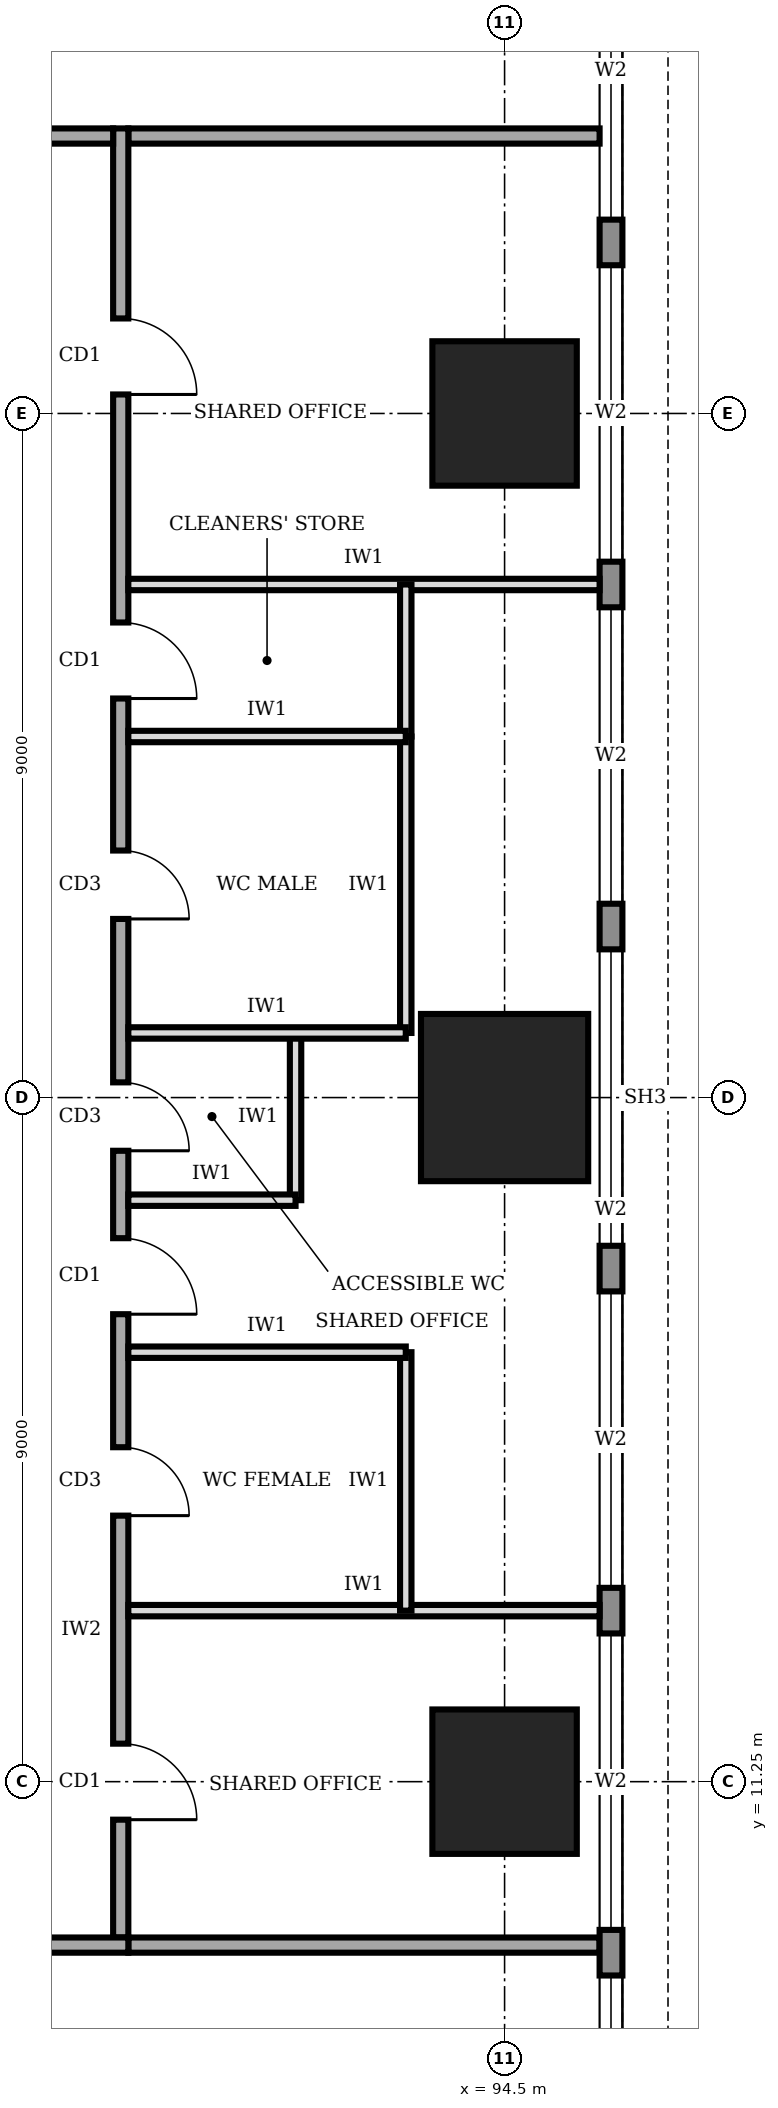
"""IFC4 building model, lengths in metres.
Left out: names, types, materials, properties, quantities, classifications, styles, units other than length and angle.
Written with IfcOpenShell. Run it as: python <this file> out.ifc"""

import sys

from ifc_helpers import new_model, si_unit, direction, frame, frame_2d, origin, origin_2d, place, context, subcontext, project, spatial, rectangle, extrude, element, fill, save


model = new_model("IFC4")
c1 = context("Model", 3, precision=1e-05, world=origin(), true_north=direction((0.0, 1.0)))
c2 = subcontext(c1, "Body", "Model", "MODEL_VIEW")
j1 = project(units=[si_unit("LENGTHUNIT", "METRE"), si_unit("PLANEANGLEUNIT", "RADIAN")], contexts=[c1])
p1 = place(None, origin())
s1 = spatial("IfcSite", under=j1, at=p1, CompositionType="ELEMENT")
p2 = place(p1, origin())
s2 = spatial("IfcBuilding", under=s1, at=p2, CompositionType="ELEMENT")
p3 = place(p2, frame((0.0, 0.0, 141.0)))
s3 = spatial("IfcBuildingStorey", under=s2, at=p3, CompositionType="ELEMENT", Elevation=141.0)
p4 = place(p3, frame((94.5, 11.25, 0.0), z_axis=(0.0, 0.0, 1.0), x_axis=(1.0, 0.0, 0.0)))
e1 = element("IfcColumn", 1, at=p4, inside=s3, PredefinedType="COLUMN", context=c2, shape_type="SweptSolid", body=[
    extrude(rectangle(XDim=1.9, YDim=1.9, at=origin_2d()), origin(), (0.0, 0.0, 1.0), 4.0),
])
p5 = place(p3, frame((94.5, 20.25, 0.0), z_axis=(0.0, 0.0, 1.0), x_axis=(1.0, 0.0, 0.0)))
e2 = element("IfcColumn", 2, at=p5, inside=s3, PredefinedType="COLUMN", context=c2, shape_type="SweptSolid", body=[
    extrude(rectangle(XDim=2.2, YDim=2.2, at=origin_2d()), origin(), (0.0, 0.0, 1.0), 4.0),
])
p6 = place(p3, frame((94.5, 29.25, 0.0), z_axis=(0.0, 0.0, 1.0), x_axis=(1.0, 0.0, 0.0)))
e3 = element("IfcColumn", 3, at=p6, inside=s3, PredefinedType="COLUMN", context=c2, shape_type="SweptSolid", body=[
    extrude(rectangle(XDim=1.9, YDim=1.9, at=origin_2d()), origin(), (0.0, 0.0, 1.0), 4.0),
])
p7 = place(p3, frame((95.9, 3.32, 0.0), z_axis=(0.0, 0.0, 1.0), x_axis=(0.0, 1.0, 0.0)))
e4 = element("IfcWall", 4, at=p7, inside=s3, PredefinedType="STANDARD", context=c2, shape_type="SweptSolid", body=[
    extrude(rectangle(XDim=33.86, YDim=0.3, at=frame_2d((16.93, 0.0))), origin(), (0.0, 0.0, 1.0), 3.75),
])
p8 = place(p7, frame((1.48, 0.0, 0.6)))
e5 = element("IfcOpeningElement", 5, at=p8, cuts=e4, PredefinedType="OPENING", context=c2, shape_type="SweptSolid", body=[
    extrude(rectangle(XDim=3.9, YDim=2.6, at=frame_2d((1.95, 1.3))), frame((0.0, 0.16, 0.0), z_axis=(0.0, -1.0, 0.0), x_axis=(1.0, 0.0, 0.0)), (0.0, 0.0, 1.0), 0.32),
])
p9 = place(p7, frame((5.98, 0.0, 0.6)))
e6 = element("IfcOpeningElement", 6, at=p9, cuts=e4, PredefinedType="OPENING", context=c2, shape_type="SweptSolid", body=[
    extrude(rectangle(XDim=3.9, YDim=2.6, at=frame_2d((1.95, 1.3))), frame((0.0, 0.16, 0.0), z_axis=(0.0, -1.0, 0.0), x_axis=(1.0, 0.0, 0.0)), (0.0, 0.0, 1.0), 0.32),
])
p10 = place(p7, frame((10.48, 0.0, 0.6)))
e7 = element("IfcOpeningElement", 7, at=p10, cuts=e4, PredefinedType="OPENING", context=c2, shape_type="SweptSolid", body=[
    extrude(rectangle(XDim=3.9, YDim=2.6, at=frame_2d((1.95, 1.3))), frame((0.0, 0.16, 0.0), z_axis=(0.0, -1.0, 0.0), x_axis=(1.0, 0.0, 0.0)), (0.0, 0.0, 1.0), 0.32),
])
p11 = place(p7, frame((14.98, 0.0, 0.6)))
e8 = element("IfcOpeningElement", 8, at=p11, cuts=e4, PredefinedType="OPENING", context=c2, shape_type="SweptSolid", body=[
    extrude(rectangle(XDim=3.9, YDim=2.6, at=frame_2d((1.95, 1.3))), frame((0.0, 0.16, 0.0), z_axis=(0.0, -1.0, 0.0), x_axis=(1.0, 0.0, 0.0)), (0.0, 0.0, 1.0), 0.32),
])
p12 = place(p7, frame((19.48, 0.0, 0.6)))
e9 = element("IfcOpeningElement", 9, at=p12, cuts=e4, PredefinedType="OPENING", context=c2, shape_type="SweptSolid", body=[
    extrude(rectangle(XDim=3.9, YDim=2.6, at=frame_2d((1.95, 1.3))), frame((0.0, 0.16, 0.0), z_axis=(0.0, -1.0, 0.0), x_axis=(1.0, 0.0, 0.0)), (0.0, 0.0, 1.0), 0.32),
])
p13 = place(p7, frame((23.98, 0.0, 0.6)))
e10 = element("IfcOpeningElement", 10, at=p13, cuts=e4, PredefinedType="OPENING", context=c2, shape_type="SweptSolid", body=[
    extrude(rectangle(XDim=3.9, YDim=2.6, at=frame_2d((1.95, 1.3))), frame((0.0, 0.16, 0.0), z_axis=(0.0, -1.0, 0.0), x_axis=(1.0, 0.0, 0.0)), (0.0, 0.0, 1.0), 0.32),
])
p14 = place(p7, frame((28.48, 0.0, 0.6)))
e11 = element("IfcOpeningElement", 11, at=p14, cuts=e4, PredefinedType="OPENING", context=c2, shape_type="SweptSolid", body=[
    extrude(rectangle(XDim=3.9, YDim=2.6, at=frame_2d((1.95, 1.3))), frame((0.0, 0.16, 0.0), z_axis=(0.0, -1.0, 0.0), x_axis=(1.0, 0.0, 0.0)), (0.0, 0.0, 1.0), 0.32),
])
p15 = place(p3, frame((63.3, 9.1, 0.0), z_axis=(0.0, 0.0, 1.0), x_axis=(1.0, 0.0, 0.0)))
e12 = element("IfcWall", 12, at=p15, inside=s3, PredefinedType="SOLIDWALL", context=c2, shape_type="SweptSolid", body=[
    extrude(rectangle(XDim=26.25, YDim=0.2, at=frame_2d((13.125, 0.0))), origin(), (0.0, 0.0, 1.0), 3.75),
])
p16 = place(p15, frame((6.0, 0.0, 0.0)))
e13 = element("IfcOpeningElement", 13, at=p16, cuts=e12, PredefinedType="OPENING", context=c2, shape_type="SweptSolid", body=[
    extrude(rectangle(XDim=1.0, YDim=2.1, at=frame_2d((0.5, 1.05))), frame((0.0, 0.11, 0.0), z_axis=(0.0, -1.0, 0.0), x_axis=(1.0, 0.0, 0.0)), (0.0, 0.0, 1.0), 0.22),
])
p17 = place(p15, frame((17.2, 0.0, 0.0)))
e14 = element("IfcOpeningElement", 14, at=p17, cuts=e12, PredefinedType="OPENING", context=c2, shape_type="SweptSolid", body=[
    extrude(rectangle(XDim=1.0, YDim=2.1, at=frame_2d((0.5, 1.05))), frame((0.0, 0.11, 0.0), z_axis=(0.0, -1.0, 0.0), x_axis=(1.0, 0.0, 0.0)), (0.0, 0.0, 1.0), 0.22),
])
p18 = place(p15, frame((23.825, 0.0, 0.0)))
e15 = element("IfcOpeningElement", 15, at=p18, cuts=e12, PredefinedType="OPENING", context=c2, shape_type="SweptSolid", body=[
    extrude(rectangle(XDim=1.0, YDim=2.1, at=frame_2d((0.5, 1.05))), frame((0.0, 0.11, 0.0), z_axis=(0.0, -1.0, 0.0), x_axis=(1.0, 0.0, 0.0)), (0.0, 0.0, 1.0), 0.22),
])
p19 = place(p3, frame((89.45, 9.2, 0.0), z_axis=(0.0, 0.0, 1.0), x_axis=(0.0, 1.0, 0.0)))
e16 = element("IfcWall", 16, at=p19, inside=s3, PredefinedType="SOLIDWALL", context=c2, shape_type="SweptSolid", body=[
    extrude(rectangle(XDim=23.8, YDim=0.2, at=frame_2d((11.9, 0.0))), origin(), (0.0, 0.0, 1.0), 3.75),
])
p20 = place(p19, frame((1.55, 0.0, 0.0)))
e17 = element("IfcOpeningElement", 17, at=p20, cuts=e16, PredefinedType="OPENING", context=c2, shape_type="SweptSolid", body=[
    extrude(rectangle(XDim=1.0, YDim=2.1, at=frame_2d((0.5, 1.05))), frame((0.0, 0.11, 0.0), z_axis=(0.0, -1.0, 0.0), x_axis=(1.0, 0.0, 0.0)), (0.0, 0.0, 1.0), 0.22),
])
p21 = place(p19, frame((5.55, 0.0, 0.0)))
e18 = element("IfcOpeningElement", 18, at=p21, cuts=e16, PredefinedType="OPENING", context=c2, shape_type="SweptSolid", body=[
    extrude(rectangle(XDim=0.9, YDim=2.1, at=frame_2d((0.45, 1.05))), frame((0.0, 0.11, 0.0), z_axis=(0.0, -1.0, 0.0), x_axis=(1.0, 0.0, 0.0)), (0.0, 0.0, 1.0), 0.22),
])
p22 = place(p19, frame((10.35, 0.0, 0.0)))
e19 = element("IfcOpeningElement", 19, at=p22, cuts=e16, PredefinedType="OPENING", context=c2, shape_type="SweptSolid", body=[
    extrude(rectangle(XDim=0.9, YDim=2.1, at=frame_2d((0.45, 1.05))), frame((0.0, 0.11, 0.0), z_axis=(0.0, -1.0, 0.0), x_axis=(1.0, 0.0, 0.0)), (0.0, 0.0, 1.0), 0.22),
])
p23 = place(p19, frame((13.4, 0.0, 0.0)))
e20 = element("IfcOpeningElement", 20, at=p23, cuts=e16, PredefinedType="OPENING", context=c2, shape_type="SweptSolid", body=[
    extrude(rectangle(XDim=0.9, YDim=2.1, at=frame_2d((0.45, 1.05))), frame((0.0, 0.11, 0.0), z_axis=(0.0, -1.0, 0.0), x_axis=(1.0, 0.0, 0.0)), (0.0, 0.0, 1.0), 0.22),
])
p24 = place(p19, frame((16.3, 0.0, 0.0)))
e21 = element("IfcOpeningElement", 21, at=p24, cuts=e16, PredefinedType="OPENING", context=c2, shape_type="SweptSolid", body=[
    extrude(rectangle(XDim=1.0, YDim=2.1, at=frame_2d((0.5, 1.05))), frame((0.0, 0.11, 0.0), z_axis=(0.0, -1.0, 0.0), x_axis=(1.0, 0.0, 0.0)), (0.0, 0.0, 1.0), 0.22),
])
p25 = place(p19, frame((8.2, 0.0, 0.0)))
e22 = element("IfcOpeningElement", 22, at=p25, cuts=e16, PredefinedType="OPENING", context=c2, shape_type="SweptSolid", body=[
    extrude(rectangle(XDim=1.0, YDim=2.1, at=frame_2d((0.5, 1.05))), frame((0.0, 0.11, 0.0), z_axis=(0.0, -1.0, 0.0), x_axis=(1.0, 0.0, 0.0)), (0.0, 0.0, 1.0), 0.22),
])
p26 = place(p19, frame((20.3, 0.0, 0.0)))
e23 = element("IfcOpeningElement", 23, at=p26, cuts=e16, PredefinedType="OPENING", context=c2, shape_type="SweptSolid", body=[
    extrude(rectangle(XDim=1.0, YDim=2.1, at=frame_2d((0.5, 1.05))), frame((0.0, 0.11, 0.0), z_axis=(0.0, -1.0, 0.0), x_axis=(1.0, 0.0, 0.0)), (0.0, 0.0, 1.0), 0.22),
])
p27 = place(p3, frame((89.35, 32.9, 0.0), z_axis=(0.0, 0.0, 1.0), x_axis=(-1.0, 0.0, 0.0)))
e24 = element("IfcWall", 24, at=p27, inside=s3, PredefinedType="SOLIDWALL", context=c2, shape_type="SweptSolid", body=[
    extrude(rectangle(XDim=26.05, YDim=0.2, at=frame_2d((13.025, 0.0))), origin(), (0.0, 0.0, 1.0), 3.75),
])
p28 = place(p27, frame((19.05, 0.0, 0.0)))
e25 = element("IfcOpeningElement", 25, at=p28, cuts=e24, PredefinedType="OPENING", context=c2, shape_type="SweptSolid", body=[
    extrude(rectangle(XDim=1.0, YDim=2.1, at=frame_2d((0.5, 1.05))), frame((0.0, 0.11, 0.0), z_axis=(0.0, -1.0, 0.0), x_axis=(1.0, 0.0, 0.0)), (0.0, 0.0, 1.0), 0.22),
])
p29 = place(p27, frame((5.425, 0.0, 0.0)))
e26 = element("IfcOpeningElement", 26, at=p29, cuts=e24, PredefinedType="OPENING", context=c2, shape_type="SweptSolid", body=[
    extrude(rectangle(XDim=1.8, YDim=2.1, at=frame_2d((0.9, 1.05))), frame((0.0, 0.11, 0.0), z_axis=(0.0, -1.0, 0.0), x_axis=(1.0, 0.0, 0.0)), (0.0, 0.0, 1.0), 0.22),
])
for number, where, z_axis, x_axis in (
    (27, (89.55, 9.1, 0.0), (0.0, 0.0, 1.0), (1.0, 0.0, 0.0)),
    (28, (89.55, 32.9, 0.0), (0.0, 0.0, 1.0), (1.0, 0.0, 0.0)),
):
    element("IfcWall", number, at=place(p3, frame(where, z_axis=z_axis, x_axis=x_axis)), inside=s3, PredefinedType="SOLIDWALL", context=c2, shape_type="SweptSolid", body=[
        extrude(rectangle(XDim=6.2, YDim=0.2, at=frame_2d((3.1, 0.0))), origin(), (0.0, 0.0, 1.0), 3.75),
    ])
for number, where, z_axis, x_axis in (
    (29, (89.55, 13.5, 0.0), (0.0, 0.0, 1.0), (1.0, 0.0, 0.0)),
    (30, (89.55, 27.0, 0.0), (0.0, 0.0, 1.0), (1.0, 0.0, 0.0)),
):
    element("IfcWall", number, at=place(p3, frame(where, z_axis=z_axis, x_axis=x_axis)), inside=s3, PredefinedType="PARTITIONING", context=c2, shape_type="SweptSolid", body=[
        extrude(rectangle(XDim=6.2, YDim=0.15, at=frame_2d((3.1, 0.0))), origin(), (0.0, 0.0, 1.0), 3.75),
    ])
p30 = place(p3, frame((89.55, 16.9, 0.0), z_axis=(0.0, 0.0, 1.0), x_axis=(1.0, 0.0, 0.0)))
e31 = element("IfcWall", 31, at=p30, inside=s3, PredefinedType="PARTITIONING", context=c2, shape_type="SweptSolid", body=[
    extrude(rectangle(XDim=3.65, YDim=0.15, at=frame_2d((1.825, 0.0))), origin(), (0.0, 0.0, 1.0), 3.75),
])
p31 = place(p3, frame((89.55, 18.9, 0.0), z_axis=(0.0, 0.0, 1.0), x_axis=(1.0, 0.0, 0.0)))
e32 = element("IfcWall", 32, at=p31, inside=s3, PredefinedType="PARTITIONING", context=c2, shape_type="SweptSolid", body=[
    extrude(rectangle(XDim=2.2, YDim=0.15, at=frame_2d((1.1, 0.0))), origin(), (0.0, 0.0, 1.0), 3.75),
])
p32 = place(p3, frame((89.55, 21.1, 0.0), z_axis=(0.0, 0.0, 1.0), x_axis=(1.0, 0.0, 0.0)))
e33 = element("IfcWall", 33, at=p32, inside=s3, PredefinedType="PARTITIONING", context=c2, shape_type="SweptSolid", body=[
    extrude(rectangle(XDim=3.65, YDim=0.15, at=frame_2d((1.825, 0.0))), origin(), (0.0, 0.0, 1.0), 2.85),
])
p33 = place(p3, frame((89.55, 25.0, 0.0), z_axis=(0.0, 0.0, 1.0), x_axis=(1.0, 0.0, 0.0)))
e34 = element("IfcWall", 34, at=p33, inside=s3, PredefinedType="PARTITIONING", context=c2, shape_type="SweptSolid", body=[
    extrude(rectangle(XDim=3.65, YDim=0.15, at=frame_2d((1.825, 0.0))), origin(), (0.0, 0.0, 1.0), 3.75),
])
p34 = place(p3, frame((93.2, 13.5, 0.0), z_axis=(0.0, 0.0, 1.0), x_axis=(0.0, 1.0, 0.0)))
e35 = element("IfcWall", 35, at=p34, inside=s3, PredefinedType="PARTITIONING", context=c2, shape_type="SweptSolid", body=[
    extrude(rectangle(XDim=3.4, YDim=0.15, at=frame_2d((1.7, 0.0))), origin(), (0.0, 0.0, 1.0), 3.75),
])
p35 = place(p3, frame((91.75, 18.9, 0.0), z_axis=(0.0, 0.0, 1.0), x_axis=(0.0, 1.0, 0.0)))
e36 = element("IfcWall", 36, at=p35, inside=s3, PredefinedType="PARTITIONING", context=c2, shape_type="SweptSolid", body=[
    extrude(rectangle(XDim=2.2, YDim=0.15, at=frame_2d((1.1, 0.0))), origin(), (0.0, 0.0, 1.0), 3.75),
])
p36 = place(p3, frame((93.2, 21.1, 0.0), z_axis=(0.0, 0.0, 1.0), x_axis=(0.0, 1.0, 0.0)))
e37 = element("IfcWall", 37, at=p36, inside=s3, PredefinedType="PARTITIONING", context=c2, shape_type="SweptSolid", body=[
    extrude(rectangle(XDim=3.9, YDim=0.15, at=frame_2d((1.95, 0.0))), origin(), (0.0, 0.0, 1.0), 3.75),
])
p37 = place(p3, frame((93.2, 25.0, 0.0), z_axis=(0.0, 0.0, 1.0), x_axis=(0.0, 1.0, 0.0)))
e38 = element("IfcWall", 38, at=p37, inside=s3, PredefinedType="PARTITIONING", context=c2, shape_type="SweptSolid", body=[
    extrude(rectangle(XDim=2.0, YDim=0.15, at=frame_2d((1.0, 0.0))), origin(), (0.0, 0.0, 1.0), 3.75),
])
p38 = place(p8, origin())
e39 = element("IfcWindow", 39, at=p38, inside=s3, PartitioningType="SINGLE_PANEL", PredefinedType="WINDOW", context=c2, shape_type="SweptSolid", body=[
    extrude(rectangle(XDim=3.9, YDim=2.6, at=frame_2d((1.95, 1.3))), frame((0.0, 0.03, 0.0), z_axis=(0.0, -1.0, 0.0), x_axis=(1.0, 0.0, 0.0)), (0.0, 0.0, 1.0), 0.06),
])
fill(e5, e39)
p39 = place(p9, origin())
e40 = element("IfcWindow", 40, at=p39, inside=s3, PartitioningType="SINGLE_PANEL", PredefinedType="WINDOW", context=c2, shape_type="SweptSolid", body=[
    extrude(rectangle(XDim=3.9, YDim=2.6, at=frame_2d((1.95, 1.3))), frame((0.0, 0.03, 0.0), z_axis=(0.0, -1.0, 0.0), x_axis=(1.0, 0.0, 0.0)), (0.0, 0.0, 1.0), 0.06),
])
fill(e6, e40)
p40 = place(p10, origin())
e41 = element("IfcWindow", 41, at=p40, inside=s3, PartitioningType="SINGLE_PANEL", PredefinedType="WINDOW", context=c2, shape_type="SweptSolid", body=[
    extrude(rectangle(XDim=3.9, YDim=2.6, at=frame_2d((1.95, 1.3))), frame((0.0, 0.03, 0.0), z_axis=(0.0, -1.0, 0.0), x_axis=(1.0, 0.0, 0.0)), (0.0, 0.0, 1.0), 0.06),
])
fill(e7, e41)
p41 = place(p11, origin())
e42 = element("IfcWindow", 42, at=p41, inside=s3, PartitioningType="SINGLE_PANEL", PredefinedType="WINDOW", context=c2, shape_type="SweptSolid", body=[
    extrude(rectangle(XDim=3.9, YDim=2.6, at=frame_2d((1.95, 1.3))), frame((0.0, 0.03, 0.0), z_axis=(0.0, -1.0, 0.0), x_axis=(1.0, 0.0, 0.0)), (0.0, 0.0, 1.0), 0.06),
])
fill(e8, e42)
p42 = place(p12, origin())
e43 = element("IfcWindow", 43, at=p42, inside=s3, PartitioningType="SINGLE_PANEL", PredefinedType="WINDOW", context=c2, shape_type="SweptSolid", body=[
    extrude(rectangle(XDim=3.9, YDim=2.6, at=frame_2d((1.95, 1.3))), frame((0.0, 0.03, 0.0), z_axis=(0.0, -1.0, 0.0), x_axis=(1.0, 0.0, 0.0)), (0.0, 0.0, 1.0), 0.06),
])
fill(e9, e43)
p43 = place(p13, origin())
e44 = element("IfcWindow", 44, at=p43, inside=s3, PartitioningType="SINGLE_PANEL", PredefinedType="WINDOW", context=c2, shape_type="SweptSolid", body=[
    extrude(rectangle(XDim=3.9, YDim=2.6, at=frame_2d((1.95, 1.3))), frame((0.0, 0.03, 0.0), z_axis=(0.0, -1.0, 0.0), x_axis=(1.0, 0.0, 0.0)), (0.0, 0.0, 1.0), 0.06),
])
fill(e10, e44)
p44 = place(p14, origin())
e45 = element("IfcWindow", 45, at=p44, inside=s3, PartitioningType="SINGLE_PANEL", PredefinedType="WINDOW", context=c2, shape_type="SweptSolid", body=[
    extrude(rectangle(XDim=3.9, YDim=2.6, at=frame_2d((1.95, 1.3))), frame((0.0, 0.03, 0.0), z_axis=(0.0, -1.0, 0.0), x_axis=(1.0, 0.0, 0.0)), (0.0, 0.0, 1.0), 0.06),
])
fill(e11, e45)
p45 = place(p20, frame((1.0, 0.0, 0.0), z_axis=(0.0, 0.0, 1.0), x_axis=(-1.0, 0.0, 0.0)))
e46 = element("IfcDoor", 46, at=p45, inside=s3, OperationType="SINGLE_SWING_RIGHT", PredefinedType="DOOR", context=c2, shape_type="SweptSolid", body=[
    extrude(rectangle(XDim=1.0, YDim=2.1, at=frame_2d((0.5, 1.05))), frame((0.0, 0.025, 0.0), z_axis=(0.0, -1.0, 0.0), x_axis=(1.0, 0.0, 0.0)), (0.0, 0.0, 1.0), 0.05),
])
fill(e17, e46)
p46 = place(p21, frame((0.9, 0.0, 0.0), z_axis=(0.0, 0.0, 1.0), x_axis=(-1.0, 0.0, 0.0)))
e47 = element("IfcDoor", 47, at=p46, inside=s3, OperationType="SINGLE_SWING_RIGHT", PredefinedType="DOOR", context=c2, shape_type="SweptSolid", body=[
    extrude(rectangle(XDim=0.9, YDim=2.1, at=frame_2d((0.45, 1.05))), frame((0.0, 0.025, 0.0), z_axis=(0.0, -1.0, 0.0), x_axis=(1.0, 0.0, 0.0)), (0.0, 0.0, 1.0), 0.05),
])
fill(e18, e47)
p47 = place(p22, frame((0.9, 0.0, 0.0), z_axis=(0.0, 0.0, 1.0), x_axis=(-1.0, 0.0, 0.0)))
e48 = element("IfcDoor", 48, at=p47, inside=s3, OperationType="SINGLE_SWING_RIGHT", PredefinedType="DOOR", context=c2, shape_type="SweptSolid", body=[
    extrude(rectangle(XDim=0.9, YDim=2.1, at=frame_2d((0.45, 1.05))), frame((0.0, 0.025, 0.0), z_axis=(0.0, -1.0, 0.0), x_axis=(1.0, 0.0, 0.0)), (0.0, 0.0, 1.0), 0.05),
])
fill(e19, e48)
p48 = place(p23, frame((0.9, 0.0, 0.0), z_axis=(0.0, 0.0, 1.0), x_axis=(-1.0, 0.0, 0.0)))
e49 = element("IfcDoor", 49, at=p48, inside=s3, OperationType="SINGLE_SWING_RIGHT", PredefinedType="DOOR", context=c2, shape_type="SweptSolid", body=[
    extrude(rectangle(XDim=0.9, YDim=2.1, at=frame_2d((0.45, 1.05))), frame((0.0, 0.025, 0.0), z_axis=(0.0, -1.0, 0.0), x_axis=(1.0, 0.0, 0.0)), (0.0, 0.0, 1.0), 0.05),
])
fill(e20, e49)
p49 = place(p24, frame((1.0, 0.0, 0.0), z_axis=(0.0, 0.0, 1.0), x_axis=(-1.0, 0.0, 0.0)))
e50 = element("IfcDoor", 50, at=p49, inside=s3, OperationType="SINGLE_SWING_RIGHT", PredefinedType="DOOR", context=c2, shape_type="SweptSolid", body=[
    extrude(rectangle(XDim=1.0, YDim=2.1, at=frame_2d((0.5, 1.05))), frame((0.0, 0.025, 0.0), z_axis=(0.0, -1.0, 0.0), x_axis=(1.0, 0.0, 0.0)), (0.0, 0.0, 1.0), 0.05),
])
fill(e21, e50)
p50 = place(p25, frame((1.0, 0.0, 0.0), z_axis=(0.0, 0.0, 1.0), x_axis=(-1.0, 0.0, 0.0)))
e51 = element("IfcDoor", 51, at=p50, inside=s3, OperationType="SINGLE_SWING_RIGHT", PredefinedType="DOOR", context=c2, shape_type="SweptSolid", body=[
    extrude(rectangle(XDim=1.0, YDim=2.1, at=frame_2d((0.5, 1.05))), frame((0.0, 0.025, 0.0), z_axis=(0.0, -1.0, 0.0), x_axis=(1.0, 0.0, 0.0)), (0.0, 0.0, 1.0), 0.05),
])
fill(e22, e51)
p51 = place(p26, frame((1.0, 0.0, 0.0), z_axis=(0.0, 0.0, 1.0), x_axis=(-1.0, 0.0, 0.0)))
e52 = element("IfcDoor", 52, at=p51, inside=s3, OperationType="SINGLE_SWING_RIGHT", PredefinedType="DOOR", context=c2, shape_type="SweptSolid", body=[
    extrude(rectangle(XDim=1.0, YDim=2.1, at=frame_2d((0.5, 1.05))), frame((0.0, 0.025, 0.0), z_axis=(0.0, -1.0, 0.0), x_axis=(1.0, 0.0, 0.0)), (0.0, 0.0, 1.0), 0.05),
])
fill(e23, e52)
save(model, sys.argv[1])
